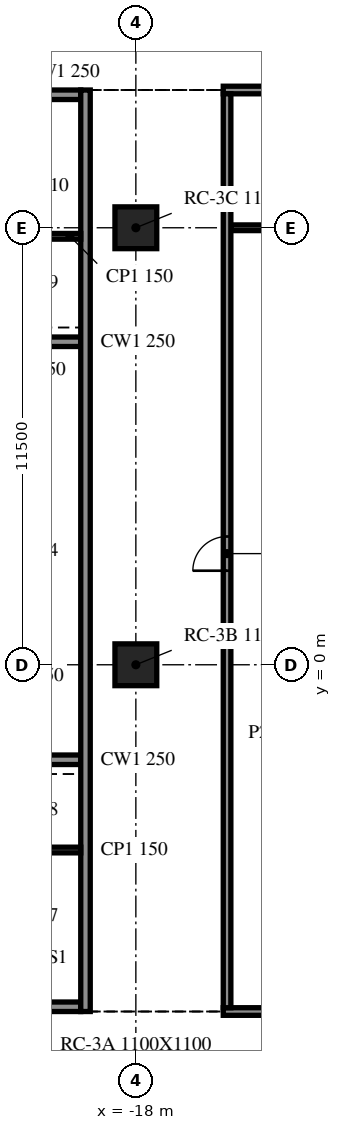
"""IFC4 building model, lengths in metres.
Left out: names, types, materials, properties, quantities, classifications, styles, units other than length and angle.
Written with IfcOpenShell. Run it as: python <this file> out.ifc"""

import sys

from ifc_helpers import new_model, si_unit, direction, frame, frame_2d, origin, origin_2d, place, context, subcontext, project, spatial, rectangle, extrude, element, fill, save


model = new_model("IFC4")
c1 = context("Model", 3, precision=1e-05, world=origin(), true_north=direction((0.0, 1.0)))
c2 = subcontext(c1, "Body", "Model", "MODEL_VIEW")
j1 = project(units=[si_unit("LENGTHUNIT", "METRE"), si_unit("PLANEANGLEUNIT", "RADIAN")], contexts=[c1])
p1 = place(None, origin())
s1 = spatial("IfcSite", under=j1, at=p1, CompositionType="ELEMENT")
p2 = place(p1, origin())
s2 = spatial("IfcBuilding", under=s1, at=p2, CompositionType="ELEMENT")
p3 = place(p2, frame((0.0, 0.0, 193.9)))
s3 = spatial("IfcBuildingStorey", under=s2, at=p3, CompositionType="ELEMENT", Elevation=193.9)
for number, where, z_axis, x_axis in (
    (1, (-18.0, 0.0, -0.34), (0.0, 0.0, 1.0), (1.0, 0.0, 0.0)),
    (2, (-18.0, 11.5, -0.34), (0.0, 0.0, 1.0), (1.0, 0.0, 0.0)),
):
    element("IfcColumn", number, at=place(p3, frame(where, z_axis=z_axis, x_axis=x_axis)), inside=s3, PredefinedType="COLUMN", context=c2, shape_type="SweptSolid", body=[
        extrude(rectangle(XDim=1.1, YDim=1.1, at=origin_2d()), origin(), (0.0, 0.0, 1.0), 3.8),
    ])
p4 = place(p3, frame((-19.325, -9.125, 0.0), z_axis=(0.0, 0.0, 1.0), x_axis=(0.0, 1.0, 0.0)))
e3 = element("IfcWall", 3, at=p4, inside=s3, PredefinedType="SOLIDWALL", context=c2, shape_type="SweptSolid", body=[
    extrude(rectangle(XDim=24.25, YDim=0.25, at=frame_2d((12.125, 0.0))), origin(), (0.0, 0.0, 1.0), 3.46),
])
p5 = place(p3, frame((-19.45, -9.0, 0.0), z_axis=(0.0, 0.0, 1.0), x_axis=(-1.0, 0.0, 0.0)))
e4 = element("IfcWall", 4, at=p5, inside=s3, PredefinedType="SOLIDWALL", context=c2, shape_type="SweptSolid", body=[
    extrude(rectangle(XDim=9.1, YDim=0.25, at=frame_2d((4.55, 0.0))), origin(), (0.0, 0.0, 1.0), 3.46),
])
p6 = place(p5, frame((3.65, 0.0, 0.0)))
e5 = element("IfcOpeningElement", 5, at=p6, cuts=e4, PredefinedType="OPENING", context=c2, shape_type="SweptSolid", body=[
    extrude(rectangle(XDim=1.8, YDim=2.1, at=frame_2d((0.9, 1.05))), frame((0.0, 0.135, 0.0), z_axis=(0.0, -1.0, 0.0), x_axis=(1.0, 0.0, 0.0)), (0.0, 0.0, 1.0), 0.27),
])
p7 = place(p3, frame((-28.55, 15.0, 0.0), z_axis=(0.0, 0.0, 1.0), x_axis=(1.0, 0.0, 0.0)))
e6 = element("IfcWall", 6, at=p7, inside=s3, PredefinedType="SOLIDWALL", context=c2, shape_type="SweptSolid", body=[
    extrude(rectangle(XDim=9.1, YDim=0.25, at=frame_2d((4.55, 0.0))), origin(), (0.0, 0.0, 1.0), 3.46),
])
p8 = place(p7, frame((3.65, 0.0, 0.0)))
e7 = element("IfcOpeningElement", 7, at=p8, cuts=e6, PredefinedType="OPENING", context=c2, shape_type="SweptSolid", body=[
    extrude(rectangle(XDim=1.8, YDim=2.1, at=frame_2d((0.9, 1.05))), frame((0.0, 0.135, 0.0), z_axis=(0.0, -1.0, 0.0), x_axis=(1.0, 0.0, 0.0)), (0.0, 0.0, 1.0), 0.27),
])
for number, where, z_axis, x_axis in (
    (8, (-22.3, -2.5, 0.0), (0.0, 0.0, 1.0), (1.0, 0.0, 0.0)),
    (9, (-22.3, 8.5, 0.0), (0.0, 0.0, 1.0), (1.0, 0.0, 0.0)),
):
    element("IfcWall", number, at=place(p3, frame(where, z_axis=z_axis, x_axis=x_axis)), inside=s3, PredefinedType="SOLIDWALL", context=c2, shape_type="SweptSolid", body=[
        extrude(rectangle(XDim=2.85, YDim=0.25, at=frame_2d((1.425, 0.0))), origin(), (0.0, 0.0, 1.0), 3.46),
    ])
for number, where, z_axis, x_axis in (
    (10, (-22.3, -4.875, 0.0), (0.0, 0.0, 1.0), (1.0, 0.0, 0.0)),
    (11, (-22.3, 11.275, 0.0), (0.0, 0.0, 1.0), (1.0, 0.0, 0.0)),
):
    element("IfcWall", number, at=place(p3, frame(where, z_axis=z_axis, x_axis=x_axis)), inside=s3, PredefinedType="PARTITIONING", context=c2, shape_type="SweptSolid", body=[
        extrude(rectangle(XDim=2.85, YDim=0.15, at=frame_2d((1.425, 0.0))), origin(), (0.0, 0.0, 1.0), 3.46),
    ])
p9 = place(p3, frame((-15.7, -9.125, 0.0), z_axis=(0.0, 0.0, 1.0), x_axis=(1.0, 0.0, 0.0)))
e12 = element("IfcWall", 12, at=p9, inside=s3, PredefinedType="PARTITIONING", context=c2, shape_type="SweptSolid", body=[
    extrude(rectangle(XDim=7.3, YDim=0.2, at=frame_2d((3.65, 0.0))), origin(), (0.0, 0.0, 1.0), 3.46),
])
p10 = place(p3, frame((-15.5, 11.5, 0.0), z_axis=(0.0, 0.0, 1.0), x_axis=(1.0, 0.0, 0.0)))
e13 = element("IfcWall", 13, at=p10, inside=s3, PredefinedType="PARTITIONING", context=c2, shape_type="SweptSolid", body=[
    extrude(rectangle(XDim=6.9, YDim=0.15, at=frame_2d((3.45, 0.0))), origin(), (0.0, 0.0, 1.0), 3.46),
])
p11 = place(p3, frame((-15.7, 15.125, 0.0), z_axis=(0.0, 0.0, 1.0), x_axis=(1.0, 0.0, 0.0)))
e14 = element("IfcWall", 14, at=p11, inside=s3, PredefinedType="PARTITIONING", context=c2, shape_type="SweptSolid", body=[
    extrude(rectangle(XDim=7.3, YDim=0.2, at=frame_2d((3.65, 0.0))), origin(), (0.0, 0.0, 1.0), 3.46),
])
p12 = place(p11, frame((3.1, 0.0, 0.0)))
e15 = element("IfcOpeningElement", 15, at=p12, cuts=e14, PredefinedType="OPENING", context=c2, shape_type="SweptSolid", body=[
    extrude(rectangle(XDim=0.9, YDim=2.1, at=frame_2d((0.45, 1.05))), frame((0.0, 0.11, 0.0), z_axis=(0.0, -1.0, 0.0), x_axis=(1.0, 0.0, 0.0)), (0.0, 0.0, 1.0), 0.22),
])
p13 = place(p3, frame((-15.6, -9.025, 0.0), z_axis=(0.0, 0.0, 1.0), x_axis=(0.0, 1.0, 0.0)))
e16 = element("IfcWall", 16, at=p13, inside=s3, PredefinedType="PARTITIONING", context=c2, shape_type="SweptSolid", body=[
    extrude(rectangle(XDim=24.05, YDim=0.2, at=frame_2d((12.025, 0.0))), origin(), (0.0, 0.0, 1.0), 3.46),
])
p14 = place(p13, frame((11.5, 0.0, 0.0)))
e17 = element("IfcOpeningElement", 17, at=p14, cuts=e16, PredefinedType="OPENING", context=c2, shape_type="SweptSolid", body=[
    extrude(rectangle(XDim=0.9, YDim=2.1, at=frame_2d((0.45, 1.05))), frame((0.0, 0.11, 0.0), z_axis=(0.0, -1.0, 0.0), x_axis=(1.0, 0.0, 0.0)), (0.0, 0.0, 1.0), 0.22),
])
p15 = place(p14, origin())
e18 = element("IfcDoor", 18, at=p15, inside=s3, OperationType="SINGLE_SWING_RIGHT", PredefinedType="DOOR", context=c2, shape_type="SweptSolid", body=[
    extrude(rectangle(XDim=0.9, YDim=2.1, at=frame_2d((0.45, 1.05))), frame((0.0, 0.025, 0.0), z_axis=(0.0, -1.0, 0.0), x_axis=(1.0, 0.0, 0.0)), (0.0, 0.0, 1.0), 0.05),
])
fill(e17, e18)
save(model, sys.argv[1])
